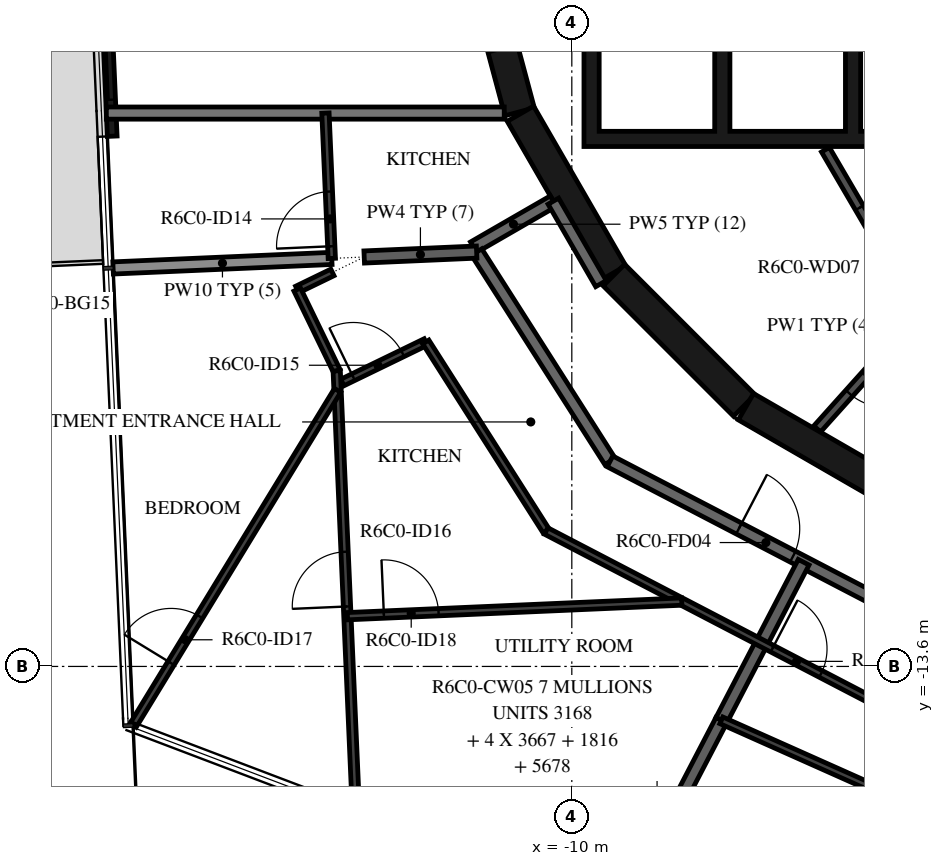
"""IFC4 building model, lengths in metres.
Left out: names, types, materials, properties, quantities, classifications, styles, units other than length and angle.
Written with IfcOpenShell. Run it as: python <this file> out.ifc"""

import sys

from ifc_helpers import new_model, si_unit, direction, frame, frame_2d, origin, place, context, subcontext, project, spatial, polyline, rectangle, outline, extrude, element, fill, save


model = new_model("IFC4")
c1 = context("Model", 3, precision=1e-05, world=origin(), true_north=direction((0.0, 1.0)))
c2 = subcontext(c1, "Body", "Model", "MODEL_VIEW")
j1 = project(units=[si_unit("LENGTHUNIT", "METRE"), si_unit("PLANEANGLEUNIT", "RADIAN")], contexts=[c1])
p1 = place(None, origin())
s1 = spatial("IfcSite", under=j1, at=p1, CompositionType="ELEMENT")
p2 = place(p1, origin())
s2 = spatial("IfcBuilding", under=s1, at=p2, CompositionType="ELEMENT")
p3 = place(p2, frame((0.0, 0.0, 247.7)))
s3 = spatial("IfcBuildingStorey", under=s2, at=p3, CompositionType="ELEMENT", Elevation=247.7)
p4 = place(p3, frame((-17.698, -1.684, 0.0), z_axis=(0.0, 0.0, 1.0), x_axis=(0.043639181999, -0.999047357133, 0.0)))
e1 = element("IfcWall", 1, at=p4, inside=s3, PredefinedType="STANDARD", context=c2, shape_type="SweptSolid", body=[
    extrude(rectangle(XDim=3.2, YDim=0.16, at=frame_2d((1.6, 0.0))), origin(), (0.0, 0.0, 1.0), 3.12),
])
p5 = place(p4, frame((0.2, 0.0, 0.0)))
e2 = element("IfcOpeningElement", 2, at=p5, cuts=e1, PredefinedType="OPENING", context=c2, shape_type="SweptSolid", body=[
    extrude(rectangle(XDim=2.4, YDim=2.4, at=frame_2d((1.2, 1.2))), frame((0.0, 0.09, 0.0), z_axis=(0.0, -1.0, 0.0), x_axis=(1.0, 0.0, 0.0)), (0.0, 0.0, 1.0), 0.18),
])
p6 = place(p3, frame((-11.643, -1.55, 0.0), z_axis=(0.0, 0.0, 1.0), x_axis=(0.258734743916, -0.965948410781, 0.0)))
e3 = element("IfcWall", 3, at=p6, inside=s3, PredefinedType="SHEAR", context=c2, shape_type="SweptSolid", body=[
    extrude(rectangle(XDim=3.033, YDim=0.5, at=frame_2d((1.516, 0.0))), origin(), (0.0, 0.0, 1.0), 3.12),
])
p7 = place(p6, frame((1.066, 0.0, 0.0)))
e4 = element("IfcOpeningElement", 4, at=p7, cuts=e3, PredefinedType="OPENING", context=c2, shape_type="SweptSolid", body=[
    extrude(rectangle(XDim=0.9, YDim=2.1, at=frame_2d((0.45, 1.05))), frame((0.0, 0.26, 0.0), z_axis=(0.0, -1.0, 0.0), x_axis=(1.0, 0.0, 0.0)), (0.0, 0.0, 1.0), 0.52),
])
p8 = place(p3, frame((-10.845, -4.51, 0.0), z_axis=(0.0, 0.0, 1.0), x_axis=(0.500087131594, -0.865975092491, 0.0)))
e5 = element("IfcWall", 5, at=p8, inside=s3, PredefinedType="SHEAR", context=c2, shape_type="SweptSolid", body=[
    extrude(rectangle(XDim=3.033, YDim=0.5, at=frame_2d((1.516, 0.0))), origin(), (0.0, 0.0, 1.0), 3.12),
])
p9 = place(p3, frame((-9.308, -7.164, 0.0), z_axis=(0.0, 0.0, 1.0), x_axis=(0.707106781187, -0.707106781187, 0.0)))
e6 = element("IfcWall", 6, at=p9, inside=s3, PredefinedType="SHEAR", context=c2, shape_type="SweptSolid", body=[
    extrude(rectangle(XDim=3.032, YDim=0.5, at=frame_2d((1.516, 0.0))), origin(), (0.0, 0.0, 1.0), 3.12),
])
p10 = place(p3, frame((-7.137, -9.329, 0.0), z_axis=(0.0, 0.0, 1.0), x_axis=(0.865975092491, -0.500087131594, 0.0)))
e7 = element("IfcWall", 7, at=p10, inside=s3, PredefinedType="SHEAR", context=c2, shape_type="SweptSolid", body=[
    extrude(rectangle(XDim=3.033, YDim=0.5, at=frame_2d((1.516, 0.0))), origin(), (0.0, 0.0, 1.0), 3.12),
])
p11 = place(p3, origin())
e8 = element("IfcWall", 8, at=p11, inside=s3, PredefinedType="SHEAR", context=c2, shape_type="SweptSolid", body=[
    extrude(outline(polyline([(9.8, -5.05), (9.8, -4.8), (9.8, -1.9), (9.55, -1.9), (9.55, -4.8), (7.65, -4.8), (7.65, -1.9), (7.4, -1.9), (7.4, -4.8), (5.5, -4.8), (5.5, -1.9), (5.25, -1.9), (5.25, -4.8), (3.35, -4.8), (3.35, -1.9), (3.1, -1.9), (3.1, -4.8), (1.2, -4.8), (1.2, -1.9), (0.95, -1.9), (0.95, -4.8), (-0.95, -4.8), (-0.95, -1.9), (-1.2, -1.9), (-1.2, -4.8), (-3.1, -4.8), (-3.1, -1.9), (-3.35, -1.9), (-3.35, -4.8), (-5.25, -4.8), (-5.25, -1.9), (-5.5, -1.9), (-5.5, -4.8), (-7.4, -4.8), (-7.4, -1.9), (-7.65, -1.9), (-7.65, -4.8), (-9.55, -4.8), (-9.55, -1.9), (-9.8, -1.9), (-9.8, -4.8), (-9.8, -5.05), (9.8, -5.05)])), origin(), (0.0, 0.0, 1.0), 3.12),
])
p12 = place(p3, frame((-5.829, -5.102, 0.0), z_axis=(0.0, 0.0, 1.0), x_axis=(0.504480008384, -0.863423373057, 0.0)))
e9 = element("IfcWall", 9, at=p12, inside=s3, PredefinedType="PARTITIONING", context=c2, shape_type="SweptSolid", body=[
    extrude(rectangle(XDim=3.115, YDim=0.15, at=frame_2d((1.558, 0.0))), origin(), (0.0, 0.0, 1.0), 3.12),
])
p13 = place(p12, frame((1.107, 0.0, 0.0)))
e10 = element("IfcOpeningElement", 10, at=p13, cuts=e9, PredefinedType="OPENING", context=c2, shape_type="SweptSolid", body=[
    extrude(rectangle(XDim=0.9, YDim=2.1, at=frame_2d((0.45, 1.05))), frame((0.0, 0.085, 0.0), z_axis=(0.0, -1.0, 0.0), x_axis=(1.0, 0.0, 0.0)), (0.0, 0.0, 1.0), 0.17),
])
p14 = place(p3, frame((-4.311, -7.851, 0.0), z_axis=(0.0, 0.0, 1.0), x_axis=(-0.667869133096, -0.744278725383, 0.0)))
e11 = element("IfcWall", 11, at=p14, inside=s3, PredefinedType="PARTITIONING", context=c2, shape_type="SweptSolid", body=[
    extrude(rectangle(XDim=2.476, YDim=0.15, at=frame_2d((1.238, 0.0))), origin(), (0.0, 0.0, 1.0), 3.12),
])
p15 = place(p14, frame((0.788, 0.0, 0.0)))
e12 = element("IfcOpeningElement", 12, at=p15, cuts=e11, PredefinedType="OPENING", context=c2, shape_type="SweptSolid", body=[
    extrude(rectangle(XDim=0.9, YDim=2.1, at=frame_2d((0.45, 1.05))), frame((0.0, 0.085, 0.0), z_axis=(0.0, -1.0, 0.0), x_axis=(1.0, 0.0, 0.0)), (0.0, 0.0, 1.0), 0.17),
])
p16 = place(p3, frame((-10.303, -5.949, 0.0), z_axis=(0.0, 0.0, 1.0), x_axis=(-0.866043382451, -0.499968858743, 0.0)))
e13 = element("IfcWall", 13, at=p16, inside=s3, PredefinedType="STANDARD", context=c2, shape_type="SweptSolid", body=[
    extrude(rectangle(XDim=1.515, YDim=0.2, at=frame_2d((0.758, 0.0))), origin(), (0.0, 0.0, 1.0), 3.12),
])
p17 = place(p3, frame((-9.52, -7.305, 0.0), z_axis=(0.0, 0.0, 1.0), x_axis=(-0.500028278809, 0.866009076391, 0.0)))
e14 = element("IfcWall", 14, at=p17, inside=s3, PredefinedType="STANDARD", context=c2, shape_type="SweptSolid", body=[
    extrude(rectangle(XDim=1.566, YDim=0.2, at=frame_2d((0.783, 0.0))), origin(), (0.0, 0.0, 1.0), 3.12),
])
p18 = place(p3, frame((-11.565, -6.786, 0.0), z_axis=(0.0, 0.0, 1.0), x_axis=(0.537297327359, -0.843392898958, 0.0)))
e15 = element("IfcWall", 15, at=p18, inside=s3, PredefinedType="STANDARD", context=c2, shape_type="SweptSolid", body=[
    extrude(rectangle(XDim=4.081, YDim=0.2, at=frame_2d((2.041, 0.0))), origin(), (0.0, 0.0, 1.0), 3.12),
])
p19 = place(p3, frame((-9.372, -10.228, 0.0), z_axis=(0.0, 0.0, 1.0), x_axis=(0.887005184532, -0.461759464021, 0.0)))
e16 = element("IfcWall", 16, at=p19, inside=s3, PredefinedType="STANDARD", context=c2, shape_type="SweptSolid", body=[
    extrude(rectangle(XDim=7.181, YDim=0.2, at=frame_2d((3.591, 0.0))), origin(), (0.0, 0.0, 1.0), 3.12),
])
p20 = place(p19, frame((2.391, 0.0, 0.0)))
e17 = element("IfcOpeningElement", 17, at=p20, cuts=e16, PredefinedType="OPENING", context=c2, shape_type="SweptSolid", body=[
    extrude(rectangle(XDim=1.0, YDim=2.1, at=frame_2d((0.5, 1.05))), frame((0.0, 0.11, 0.0), z_axis=(0.0, -1.0, 0.0), x_axis=(1.0, 0.0, 0.0)), (0.0, 0.0, 1.0), 0.22),
])
p21 = place(p3, frame((-17.655, -4.5, 0.0), z_axis=(0.0, 0.0, 1.0), x_axis=(1.0, 0.0, 0.0)))
e18 = element("IfcWall", 18, at=p21, inside=s3, PredefinedType="STANDARD", context=c2, shape_type="SweptSolid", body=[
    extrude(rectangle(XDim=6.543, YDim=0.2, at=frame_2d((3.272, 0.0))), origin(), (0.0, 0.0, 1.0), 3.12),
])
p22 = place(p3, frame((-17.544, -7.047, 0.0), z_axis=(0.0, 0.0, 1.0), x_axis=(0.999045894436, 0.043672655174, 0.0)))
e19 = element("IfcWall", 19, at=p22, inside=s3, PredefinedType="STANDARD", context=c2, shape_type="SweptSolid", body=[
    extrude(rectangle(XDim=3.6, YDim=0.2, at=frame_2d((1.8, 0.0))), origin(), (0.0, 0.0, 1.0), 2.73),
])
p23 = place(p3, frame((-13.414, -6.867, 0.0), z_axis=(0.0, 0.0, 1.0), x_axis=(0.999046427216, 0.043660465726, 0.0)))
e20 = element("IfcWall", 20, at=p23, inside=s3, PredefinedType="STANDARD", context=c2, shape_type="SweptSolid", body=[
    extrude(rectangle(XDim=1.851, YDim=0.2, at=frame_2d((0.925, 0.0))), origin(), (0.0, 0.0, 1.0), 3.12),
])
p24 = place(p3, frame((-7.541, -14.486, 0.0), z_axis=(0.0, 0.0, 1.0), x_axis=(0.461746051786, 0.88701216658, 0.0)))
e21 = element("IfcWall", 21, at=p24, inside=s3, PredefinedType="STANDARD", context=c2, shape_type="SweptSolid", body=[
    extrude(rectangle(XDim=2.931, YDim=0.2, at=frame_2d((1.466, 0.0))), origin(), (0.0, 0.0, 1.0), 3.12),
])
p25 = place(p3, frame((-8.327, -15.996, 0.0), z_axis=(0.0, 0.0, 1.0), x_axis=(0.461722915657, 0.887024210017, 0.0)))
e22 = element("IfcWall", 22, at=p25, inside=s3, PredefinedType="STANDARD", context=c2, shape_type="SweptSolid", body=[
    extrude(rectangle(XDim=1.703, YDim=0.2, at=frame_2d((0.851, 0.0))), origin(), (0.0, 0.0, 1.0), 3.12),
])
p26 = place(p3, frame((-13.947, -6.89, 0.0), z_axis=(0.0, 0.0, 1.0), x_axis=(-0.043680814195, 0.999045537737, 0.0)))
e23 = element("IfcWall", 23, at=p26, inside=s3, PredefinedType="PARTITIONING", context=c2, shape_type="SweptSolid", body=[
    extrude(rectangle(XDim=2.392, YDim=0.12, at=frame_2d((1.196, 0.0))), origin(), (0.0, 0.0, 1.0), 3.12),
])
p27 = place(p26, frame((0.2, 0.0, 0.0)))
e24 = element("IfcOpeningElement", 24, at=p27, cuts=e23, PredefinedType="OPENING", context=c2, shape_type="SweptSolid", body=[
    extrude(rectangle(XDim=0.9, YDim=2.1, at=frame_2d((0.45, 1.05))), frame((0.0, 0.07, 0.0), z_axis=(0.0, -1.0, 0.0), x_axis=(1.0, 0.0, 0.0)), (0.0, 0.0, 1.0), 0.14),
])
p28 = place(p3, frame((-13.937, -7.121, 0.0), z_axis=(0.0, 0.0, 1.0), x_axis=(-0.899601864835, -0.436710985418, 0.0)))
e25 = element("IfcWall", 25, at=p28, inside=s3, PredefinedType="PARTITIONING", context=c2, shape_type="SweptSolid", body=[
    extrude(rectangle(XDim=0.644, YDim=0.12, at=frame_2d((0.322, 0.0))), origin(), (0.0, 0.0, 1.0), 3.12),
])
p29 = place(p3, frame((-14.516, -7.402, 0.0), z_axis=(0.0, 0.0, 1.0), x_axis=(0.436676244377, -0.899618729016, 0.0)))
e26 = element("IfcWall", 26, at=p29, inside=s3, PredefinedType="PARTITIONING", context=c2, shape_type="SweptSolid", body=[
    extrude(rectangle(XDim=1.487, YDim=0.12, at=frame_2d((0.744, 0.0))), origin(), (0.0, 0.0, 1.0), 3.12),
])
p30 = place(p3, frame((-13.773, -8.931, 0.0), z_axis=(0.0, 0.0, 1.0), x_axis=(0.899585443678, 0.436744810527, 0.0)))
e27 = element("IfcWall", 27, at=p30, inside=s3, PredefinedType="PARTITIONING", context=c2, shape_type="SweptSolid", body=[
    extrude(rectangle(XDim=1.525, YDim=0.12, at=frame_2d((0.762, 0.0))), origin(), (0.0, 0.0, 1.0), 3.12),
])
p31 = place(p30, frame((0.2, 0.0, 0.0)))
e28 = element("IfcOpeningElement", 28, at=p31, cuts=e27, PredefinedType="OPENING", context=c2, shape_type="SweptSolid", body=[
    extrude(rectangle(XDim=0.9, YDim=2.1, at=frame_2d((0.45, 1.05))), frame((0.0, 0.07, 0.0), z_axis=(0.0, -1.0, 0.0), x_axis=(1.0, 0.0, 0.0)), (0.0, 0.0, 1.0), 0.14),
])
p32 = place(p3, frame((-12.402, -8.265, 0.0), z_axis=(0.0, 0.0, 1.0), x_axis=(0.537321213777, -0.843377681247, 0.0)))
e29 = element("IfcWall", 29, at=p32, inside=s3, PredefinedType="PARTITIONING", context=c2, shape_type="SweptSolid", body=[
    extrude(rectangle(XDim=3.685, YDim=0.12, at=frame_2d((1.843, 0.0))), origin(), (0.0, 0.0, 1.0), 3.12),
])
p33 = place(p3, frame((-10.421, -11.373, 0.0), z_axis=(0.0, 0.0, 1.0), x_axis=(0.887012970857, -0.461744506769, 0.0)))
e30 = element("IfcWall", 30, at=p33, inside=s3, PredefinedType="PARTITIONING", context=c2, shape_type="SweptSolid", body=[
    extrude(rectangle(XDim=7.985, YDim=0.12, at=frame_2d((3.992, 0.0))), origin(), (0.0, 0.0, 1.0), 3.12),
])
p34 = place(p33, frame((4.192, 0.0, 0.0)))
e31 = element("IfcOpeningElement", 31, at=p34, cuts=e30, PredefinedType="OPENING", context=c2, shape_type="SweptSolid", body=[
    extrude(rectangle(XDim=0.9, YDim=2.1, at=frame_2d((0.45, 1.05))), frame((0.0, 0.07, 0.0), z_axis=(0.0, -1.0, 0.0), x_axis=(1.0, 0.0, 0.0)), (0.0, 0.0, 1.0), 0.14),
])
p35 = place(p3, frame((-13.496, -17.218, 0.0), z_axis=(0.0, 0.0, 1.0), x_axis=(-0.043640714674, 0.999047290183, 0.0)))
e32 = element("IfcWall", 32, at=p35, inside=s3, PredefinedType="PARTITIONING", context=c2, shape_type="SweptSolid", body=[
    extrude(rectangle(XDim=8.487, YDim=0.12, at=frame_2d((4.243, 0.0))), origin(), (0.0, 0.0, 1.0), 3.12),
])
p36 = place(p35, frame((4.608, 0.0, 0.0)))
e33 = element("IfcOpeningElement", 33, at=p36, cuts=e32, PredefinedType="OPENING", context=c2, shape_type="SweptSolid", body=[
    extrude(rectangle(XDim=0.9, YDim=2.1, at=frame_2d((0.45, 1.05))), frame((0.0, 0.07, 0.0), z_axis=(0.0, -1.0, 0.0), x_axis=(1.0, 0.0, 0.0)), (0.0, 0.0, 1.0), 0.14),
])
p37 = place(p3, frame((-17.215, -14.57, 0.0), z_axis=(0.0, 0.0, 1.0), x_axis=(0.520949659667, 0.853587401555, 0.0)))
e34 = element("IfcWall", 34, at=p37, inside=s3, PredefinedType="PARTITIONING", context=c2, shape_type="SweptSolid", body=[
    extrude(rectangle(XDim=6.455, YDim=0.12, at=frame_2d((3.228, 0.0))), origin(), (0.0, 0.0, 1.0), 3.12),
])
p38 = place(p37, frame((1.2, 0.0, 0.0)))
e35 = element("IfcOpeningElement", 35, at=p38, cuts=e34, PredefinedType="OPENING", context=c2, shape_type="SweptSolid", body=[
    extrude(rectangle(XDim=0.9, YDim=2.1, at=frame_2d((0.45, 1.05))), frame((0.0, 0.07, 0.0), z_axis=(0.0, -1.0, 0.0), x_axis=(1.0, 0.0, 0.0)), (0.0, 0.0, 1.0), 0.14),
])
p39 = place(p3, frame((-13.69, -12.774, 0.0), z_axis=(0.0, 0.0, 1.0), x_axis=(0.999048778431, 0.043606631553, 0.0)))
e36 = element("IfcWall", 36, at=p39, inside=s3, PredefinedType="PARTITIONING", context=c2, shape_type="SweptSolid", body=[
    extrude(rectangle(XDim=5.503, YDim=0.12, at=frame_2d((2.752, 0.0))), origin(), (0.0, 0.0, 1.0), 3.12),
])
p40 = place(p39, frame((0.6, 0.0, 0.0)))
e37 = element("IfcOpeningElement", 37, at=p40, cuts=e36, PredefinedType="OPENING", context=c2, shape_type="SweptSolid", body=[
    extrude(rectangle(XDim=0.9, YDim=2.1, at=frame_2d((0.45, 1.05))), frame((0.0, 0.07, 0.0), z_axis=(0.0, -1.0, 0.0), x_axis=(1.0, 0.0, 0.0)), (0.0, 0.0, 1.0), 0.14),
])
p41 = place(p3, frame((-6.932, -20.345, 0.0), z_axis=(0.0, 0.0, 1.0), x_axis=(0.843388627156, 0.537304032726, 0.0)))
e38 = element("IfcWall", 38, at=p41, inside=s3, PredefinedType="PARTITIONING", context=c2, shape_type="SweptSolid", body=[
    extrude(rectangle(XDim=10.246, YDim=0.12, at=frame_2d((5.123, 0.0))), origin(), (0.0, 0.0, 1.0), 3.12),
])
p42 = place(p41, frame((2.138, 0.0, 0.0)))
e39 = element("IfcOpeningElement", 39, at=p42, cuts=e38, PredefinedType="OPENING", context=c2, shape_type="SweptSolid", body=[
    extrude(rectangle(XDim=0.9, YDim=2.1, at=frame_2d((0.45, 1.05))), frame((0.0, 0.07, 0.0), z_axis=(0.0, -1.0, 0.0), x_axis=(1.0, 0.0, 0.0)), (0.0, 0.0, 1.0), 0.14),
])
p43 = place(p41, frame((6.268, 0.0, 0.0)))
e40 = element("IfcOpeningElement", 40, at=p43, cuts=e38, PredefinedType="OPENING", context=c2, shape_type="SweptSolid", body=[
    extrude(rectangle(XDim=0.9, YDim=2.1, at=frame_2d((0.45, 1.05))), frame((0.0, 0.07, 0.0), z_axis=(0.0, -1.0, 0.0), x_axis=(1.0, 0.0, 0.0)), (0.0, 0.0, 1.0), 0.14),
])
p44 = place(p3, frame((-1.773, -17.059, 0.0), z_axis=(0.0, 0.0, 1.0), x_axis=(-0.913279926902, 0.407332511736, 0.0)))
e41 = element("IfcWall", 41, at=p44, inside=s3, PredefinedType="PARTITIONING", context=c2, shape_type="SweptSolid", body=[
    extrude(rectangle(XDim=6.315, YDim=0.12, at=frame_2d((3.158, 0.0))), origin(), (0.0, 0.0, 1.0), 3.12),
])
p45 = place(p44, frame((0.5, 0.0, 0.0)))
e42 = element("IfcOpeningElement", 42, at=p45, cuts=e41, PredefinedType="OPENING", context=c2, shape_type="SweptSolid", body=[
    extrude(rectangle(XDim=0.9, YDim=2.1, at=frame_2d((0.45, 1.05))), frame((0.0, 0.07, 0.0), z_axis=(0.0, -1.0, 0.0), x_axis=(1.0, 0.0, 0.0)), (0.0, 0.0, 1.0), 0.14),
])
p46 = place(p5, origin())
e43 = element("IfcDoor", 43, at=p46, inside=s3, OperationType="DOUBLE_DOOR_SLIDING", PredefinedType="DOOR", context=c2, shape_type="SweptSolid", body=[
    extrude(rectangle(XDim=2.4, YDim=2.4, at=frame_2d((1.2, 1.2))), frame((0.0, 0.025, 0.0), z_axis=(0.0, -1.0, 0.0), x_axis=(1.0, 0.0, 0.0)), (0.0, 0.0, 1.0), 0.05),
])
fill(e2, e43)
p47 = place(p15, origin())
e44 = element("IfcDoor", 44, at=p47, inside=s3, OperationType="SINGLE_SWING_RIGHT", PredefinedType="DOOR", context=c2, shape_type="SweptSolid", body=[
    extrude(rectangle(XDim=0.9, YDim=2.1, at=frame_2d((0.45, 1.05))), frame((0.0, 0.025, 0.0), z_axis=(0.0, -1.0, 0.0), x_axis=(1.0, 0.0, 0.0)), (0.0, 0.0, 1.0), 0.05),
])
fill(e12, e44)
p48 = place(p13, origin())
e45 = element("IfcDoor", 45, at=p48, inside=s3, OperationType="SINGLE_SWING_LEFT", PredefinedType="DOOR", context=c2, shape_type="SweptSolid", body=[
    extrude(rectangle(XDim=0.9, YDim=2.1, at=frame_2d((0.45, 1.05))), frame((0.0, 0.025, 0.0), z_axis=(0.0, -1.0, 0.0), x_axis=(1.0, 0.0, 0.0)), (0.0, 0.0, 1.0), 0.05),
])
fill(e10, e45)
p49 = place(p27, origin())
e46 = element("IfcDoor", 46, at=p49, inside=s3, OperationType="SINGLE_SWING_LEFT", PredefinedType="DOOR", context=c2, shape_type="SweptSolid", body=[
    extrude(rectangle(XDim=0.9, YDim=2.1, at=frame_2d((0.45, 1.05))), frame((0.0, 0.025, 0.0), z_axis=(0.0, -1.0, 0.0), x_axis=(1.0, 0.0, 0.0)), (0.0, 0.0, 1.0), 0.05),
])
fill(e24, e46)
p50 = place(p20, origin())
e47 = element("IfcDoor", 47, at=p50, inside=s3, OperationType="SINGLE_SWING_RIGHT", PredefinedType="DOOR", context=c2, shape_type="SweptSolid", body=[
    extrude(rectangle(XDim=1.0, YDim=2.1, at=frame_2d((0.5, 1.05))), frame((0.0, 0.025, 0.0), z_axis=(0.0, -1.0, 0.0), x_axis=(1.0, 0.0, 0.0)), (0.0, 0.0, 1.0), 0.05),
])
fill(e17, e47)
p51 = place(p31, origin())
e48 = element("IfcDoor", 48, at=p51, inside=s3, OperationType="SINGLE_SWING_LEFT", PredefinedType="DOOR", context=c2, shape_type="SweptSolid", body=[
    extrude(rectangle(XDim=0.9, YDim=2.1, at=frame_2d((0.45, 1.05))), frame((0.0, 0.025, 0.0), z_axis=(0.0, -1.0, 0.0), x_axis=(1.0, 0.0, 0.0)), (0.0, 0.0, 1.0), 0.05),
])
fill(e28, e48)
p52 = place(p36, origin())
e49 = element("IfcDoor", 49, at=p52, inside=s3, OperationType="SINGLE_SWING_RIGHT", PredefinedType="DOOR", context=c2, shape_type="SweptSolid", body=[
    extrude(rectangle(XDim=0.9, YDim=2.1, at=frame_2d((0.45, 1.05))), frame((0.0, 0.025, 0.0), z_axis=(0.0, -1.0, 0.0), x_axis=(1.0, 0.0, 0.0)), (0.0, 0.0, 1.0), 0.05),
])
fill(e33, e49)
p53 = place(p38, origin())
e50 = element("IfcDoor", 50, at=p53, inside=s3, OperationType="SINGLE_SWING_LEFT", PredefinedType="DOOR", context=c2, shape_type="SweptSolid", body=[
    extrude(rectangle(XDim=0.9, YDim=2.1, at=frame_2d((0.45, 1.05))), frame((0.0, 0.025, 0.0), z_axis=(0.0, -1.0, 0.0), x_axis=(1.0, 0.0, 0.0)), (0.0, 0.0, 1.0), 0.05),
])
fill(e35, e50)
p54 = place(p40, origin())
e51 = element("IfcDoor", 51, at=p54, inside=s3, OperationType="SINGLE_SWING_RIGHT", PredefinedType="DOOR", context=c2, shape_type="SweptSolid", body=[
    extrude(rectangle(XDim=0.9, YDim=2.1, at=frame_2d((0.45, 1.05))), frame((0.0, 0.025, 0.0), z_axis=(0.0, -1.0, 0.0), x_axis=(1.0, 0.0, 0.0)), (0.0, 0.0, 1.0), 0.05),
])
fill(e37, e51)
p55 = place(p34, origin())
e52 = element("IfcDoor", 52, at=p55, inside=s3, OperationType="SINGLE_SWING_LEFT", PredefinedType="DOOR", context=c2, shape_type="SweptSolid", body=[
    extrude(rectangle(XDim=0.9, YDim=2.1, at=frame_2d((0.45, 1.05))), frame((0.0, 0.025, 0.0), z_axis=(0.0, -1.0, 0.0), x_axis=(1.0, 0.0, 0.0)), (0.0, 0.0, 1.0), 0.05),
])
fill(e31, e52)
save(model, sys.argv[1])
